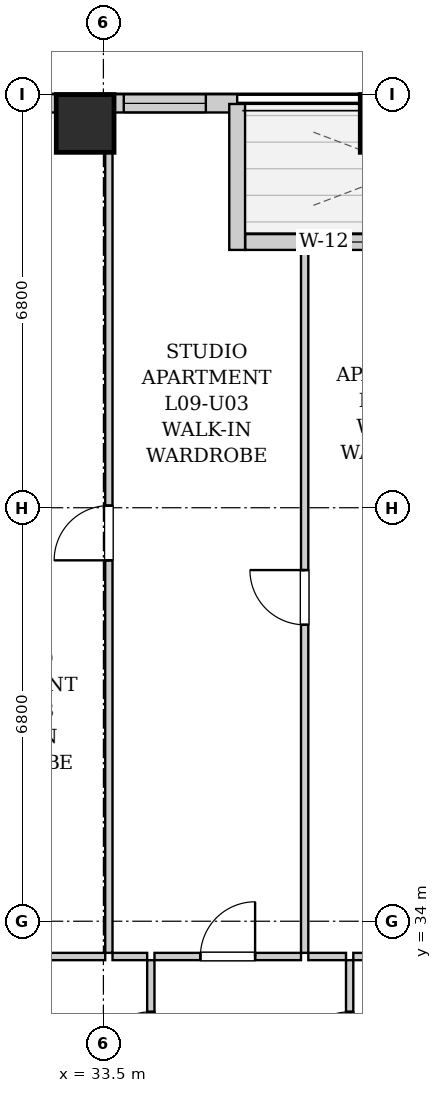
"""IFC4 building model, lengths in metres.
Left out: names, types, materials, properties, quantities, classifications, styles, units other than length and angle.
Written with IfcOpenShell. Run it as: python <this file> out.ifc"""

import sys

from ifc_helpers import new_model, si_unit, direction, frame, frame_2d, origin, origin_2d, place, context, subcontext, project, spatial, rectangle, extrude, element, fill, save


model = new_model("IFC4")
c1 = context("Model", 3, precision=1e-05, world=origin(), true_north=direction((0.0, 1.0)))
c2 = subcontext(c1, "Body", "Model", "MODEL_VIEW")
j1 = project(units=[si_unit("LENGTHUNIT", "METRE"), si_unit("PLANEANGLEUNIT", "RADIAN")], contexts=[c1])
p1 = place(None, origin())
s1 = spatial("IfcSite", under=j1, at=p1, CompositionType="ELEMENT")
p2 = place(p1, origin())
s2 = spatial("IfcBuilding", under=s1, at=p2, CompositionType="ELEMENT")
p3 = place(p2, frame((0.0, 0.0, 38.6)))
s3 = spatial("IfcBuildingStorey", under=s2, at=p3, CompositionType="ELEMENT", Elevation=38.6)
for number, where, z_axis, x_axis in (
    (1, (33.2, 47.12, 0.0), (0.0, 0.0, 1.0), (1.0, 0.0, 0.0)),
    (2, (38.2, 47.12, 0.0), (0.0, 0.0, 1.0), (1.0, 0.0, 0.0)),
):
    element("IfcColumn", number, at=place(p3, frame(where, z_axis=z_axis, x_axis=x_axis)), inside=s3, PredefinedType="COLUMN", context=c2, shape_type="SweptSolid", body=[
        extrude(rectangle(XDim=0.95, YDim=0.95, at=origin_2d()), origin(), (0.0, 0.0, 1.0), 3.2),
    ])
p4 = place(p3, frame((10.0, 47.45, 0.0), z_axis=(0.0, 0.0, 1.0), x_axis=(1.0, 0.0, 0.0)))
e3 = element("IfcWall", 3, at=p4, inside=s3, PredefinedType="SOLIDWALL", context=c2, shape_type="SweptSolid", body=[
    extrude(rectangle(XDim=25.7, YDim=0.3, at=frame_2d((12.85, 0.0))), origin(), (0.0, 0.0, 1.0), 1.975),
])
p5 = place(p4, frame((1.73, 0.0, 0.55)))
e4 = element("IfcOpeningElement", 4, at=p5, cuts=e3, PredefinedType="OPENING", context=c2, shape_type="SweptSolid", body=[
    extrude(rectangle(XDim=1.8, YDim=1.2, at=frame_2d((0.9, 0.6))), frame((0.0, 0.16, 0.0), z_axis=(0.0, -1.0, 0.0), x_axis=(1.0, 0.0, 0.0)), (0.0, 0.0, 1.0), 0.32),
])
p6 = place(p4, frame((4.961, 0.0, 0.55)))
e5 = element("IfcOpeningElement", 5, at=p6, cuts=e3, PredefinedType="OPENING", context=c2, shape_type="SweptSolid", body=[
    extrude(rectangle(XDim=1.8, YDim=1.2, at=frame_2d((0.9, 0.6))), frame((0.0, 0.16, 0.0), z_axis=(0.0, -1.0, 0.0), x_axis=(1.0, 0.0, 0.0)), (0.0, 0.0, 1.0), 0.32),
])
p7 = place(p4, frame((8.435, 0.0, 0.55)))
e6 = element("IfcOpeningElement", 6, at=p7, cuts=e3, PredefinedType="OPENING", context=c2, shape_type="SweptSolid", body=[
    extrude(rectangle(XDim=1.8, YDim=1.2, at=frame_2d((0.9, 0.6))), frame((0.0, 0.16, 0.0), z_axis=(0.0, -1.0, 0.0), x_axis=(1.0, 0.0, 0.0)), (0.0, 0.0, 1.0), 0.32),
])
p8 = place(p4, frame((11.15, 0.0, 0.55)))
e7 = element("IfcOpeningElement", 7, at=p8, cuts=e3, PredefinedType="OPENING", context=c2, shape_type="SweptSolid", body=[
    extrude(rectangle(XDim=1.35, YDim=1.2, at=frame_2d((0.675, 0.6))), frame((0.0, 0.16, 0.0), z_axis=(0.0, -1.0, 0.0), x_axis=(1.0, 0.0, 0.0)), (0.0, 0.0, 1.0), 0.32),
])
p9 = place(p4, frame((17.812, 0.0, 0.55)))
e8 = element("IfcOpeningElement", 8, at=p9, cuts=e3, PredefinedType="OPENING", context=c2, shape_type="SweptSolid", body=[
    extrude(rectangle(XDim=1.8, YDim=1.2, at=frame_2d((0.9, 0.6))), frame((0.0, 0.16, 0.0), z_axis=(0.0, -1.0, 0.0), x_axis=(1.0, 0.0, 0.0)), (0.0, 0.0, 1.0), 0.32),
])
p10 = place(p4, frame((20.765, 0.0, 0.55)))
e9 = element("IfcOpeningElement", 9, at=p10, cuts=e3, PredefinedType="OPENING", context=c2, shape_type="SweptSolid", body=[
    extrude(rectangle(XDim=1.8, YDim=1.2, at=frame_2d((0.9, 0.6))), frame((0.0, 0.16, 0.0), z_axis=(0.0, -1.0, 0.0), x_axis=(1.0, 0.0, 0.0)), (0.0, 0.0, 1.0), 0.32),
])
p11 = place(p4, frame((23.835, 0.0, 0.55)))
e10 = element("IfcOpeningElement", 10, at=p11, cuts=e3, PredefinedType="OPENING", context=c2, shape_type="SweptSolid", body=[
    extrude(rectangle(XDim=1.35, YDim=1.2, at=frame_2d((0.675, 0.6))), frame((0.0, 0.16, 0.0), z_axis=(0.0, -1.0, 0.0), x_axis=(1.0, 0.0, 0.0)), (0.0, 0.0, 1.0), 0.32),
])
p12 = place(p3, frame((35.7, 47.44, 0.0), z_axis=(0.0, 0.0, 1.0), x_axis=(0.0, -1.0, 0.0)))
e11 = element("IfcWall", 11, at=p12, inside=s3, PredefinedType="SOLIDWALL", context=c2, shape_type="SweptSolid", body=[
    extrude(rectangle(XDim=2.4, YDim=0.26, at=frame_2d((1.2, 0.0))), origin(), (0.0, 0.0, 1.0), 2.94),
])
p13 = place(p3, frame((35.834, 45.17, 0.0), z_axis=(0.0, 0.0, 1.0), x_axis=(1.0, 0.0, 0.0)))
e12 = element("IfcWall", 12, at=p13, inside=s3, PredefinedType="SOLIDWALL", context=c2, shape_type="SweptSolid", body=[
    extrude(rectangle(XDim=5.432, YDim=0.26, at=frame_2d((2.716, 0.0))), origin(), (0.0, 0.0, 1.0), 2.94),
])
p14 = place(p13, frame((2.166, 0.0, 0.0)))
e13 = element("IfcOpeningElement", 13, at=p14, cuts=e12, PredefinedType="OPENING", context=c2, shape_type="SweptSolid", body=[
    extrude(rectangle(XDim=1.1, YDim=2.0, at=frame_2d((0.55, 1.0))), frame((0.0, 0.14, 0.0), z_axis=(0.0, -1.0, 0.0), x_axis=(1.0, 0.0, 0.0)), (0.0, 0.0, 1.0), 0.28),
])
p15 = place(p13, frame((1.326, 0.0, 0.55)))
e14 = element("IfcOpeningElement", 14, at=p15, cuts=e12, PredefinedType="OPENING", context=c2, shape_type="SweptSolid", body=[
    extrude(rectangle(XDim=0.68, YDim=1.2, at=frame_2d((0.34, 0.6))), frame((0.0, 0.14, 0.0), z_axis=(0.0, -1.0, 0.0), x_axis=(1.0, 0.0, 0.0)), (0.0, 0.0, 1.0), 0.28),
])
p16 = place(p3, frame((34.28, 30.76, 0.0), z_axis=(0.0, 0.0, 1.0), x_axis=(0.0, 1.0, 0.0)))
e15 = element("IfcWall", 15, at=p16, inside=s3, PredefinedType="PARTITIONING", context=c2, shape_type="SweptSolid", body=[
    extrude(rectangle(XDim=2.6, YDim=0.12, at=frame_2d((1.3, 0.0))), origin(), (0.0, 0.0, 1.0), 2.94),
])
p17 = place(p16, frame((0.85, 0.0, 0.0)))
e16 = element("IfcOpeningElement", 16, at=p17, cuts=e15, PredefinedType="OPENING", context=c2, shape_type="SweptSolid", body=[
    extrude(rectangle(XDim=0.9, YDim=2.05, at=frame_2d((0.45, 1.025))), frame((0.0, 0.07, 0.0), z_axis=(0.0, -1.0, 0.0), x_axis=(1.0, 0.0, 0.0)), (0.0, 0.0, 1.0), 0.14),
])
p18 = place(p3, frame((30.62, 33.42, 0.0), z_axis=(0.0, 0.0, 1.0), x_axis=(1.0, 0.0, 0.0)))
e17 = element("IfcWall", 17, at=p18, inside=s3, PredefinedType="PARTITIONING", context=c2, shape_type="SweptSolid", body=[
    extrude(rectangle(XDim=2.91, YDim=0.12, at=frame_2d((1.455, 0.0))), origin(), (0.0, 0.0, 1.0), 2.94),
])
p19 = place(p18, frame((1.005, 0.0, 0.0)))
e18 = element("IfcOpeningElement", 18, at=p19, cuts=e17, PredefinedType="OPENING", context=c2, shape_type="SweptSolid", body=[
    extrude(rectangle(XDim=0.9, YDim=2.05, at=frame_2d((0.45, 1.025))), frame((0.0, 0.07, 0.0), z_axis=(0.0, -1.0, 0.0), x_axis=(1.0, 0.0, 0.0)), (0.0, 0.0, 1.0), 0.14),
])
p20 = place(p3, frame((33.65, 33.42, 0.0), z_axis=(0.0, 0.0, 1.0), x_axis=(1.0, 0.0, 0.0)))
e19 = element("IfcWall", 19, at=p20, inside=s3, PredefinedType="PARTITIONING", context=c2, shape_type="SweptSolid", body=[
    extrude(rectangle(XDim=0.57, YDim=0.12, at=frame_2d((0.285, 0.0))), origin(), (0.0, 0.0, 1.0), 2.94),
])
p21 = place(p3, frame((37.55, 30.76, 0.0), z_axis=(0.0, 0.0, 1.0), x_axis=(0.0, 1.0, 0.0)))
e20 = element("IfcWall", 20, at=p21, inside=s3, PredefinedType="PARTITIONING", context=c2, shape_type="SweptSolid", body=[
    extrude(rectangle(XDim=2.6, YDim=0.12, at=frame_2d((1.3, 0.0))), origin(), (0.0, 0.0, 1.0), 2.94),
])
p22 = place(p21, frame((0.85, 0.0, 0.0)))
e21 = element("IfcOpeningElement", 21, at=p22, cuts=e20, PredefinedType="OPENING", context=c2, shape_type="SweptSolid", body=[
    extrude(rectangle(XDim=0.9, YDim=2.05, at=frame_2d((0.45, 1.025))), frame((0.0, 0.07, 0.0), z_axis=(0.0, -1.0, 0.0), x_axis=(1.0, 0.0, 0.0)), (0.0, 0.0, 1.0), 0.14),
])
p23 = place(p3, frame((34.34, 33.42, 0.0), z_axis=(0.0, 0.0, 1.0), x_axis=(1.0, 0.0, 0.0)))
e22 = element("IfcWall", 22, at=p23, inside=s3, PredefinedType="PARTITIONING", context=c2, shape_type="SweptSolid", body=[
    extrude(rectangle(XDim=2.41, YDim=0.12, at=frame_2d((1.205, 0.0))), origin(), (0.0, 0.0, 1.0), 2.94),
])
p24 = place(p23, frame((0.755, 0.0, 0.0)))
e23 = element("IfcOpeningElement", 23, at=p24, cuts=e22, PredefinedType="OPENING", context=c2, shape_type="SweptSolid", body=[
    extrude(rectangle(XDim=0.9, YDim=2.05, at=frame_2d((0.45, 1.025))), frame((0.0, 0.07, 0.0), z_axis=(0.0, -1.0, 0.0), x_axis=(1.0, 0.0, 0.0)), (0.0, 0.0, 1.0), 0.14),
])
p25 = place(p3, frame((36.87, 33.42, 0.0), z_axis=(0.0, 0.0, 1.0), x_axis=(1.0, 0.0, 0.0)))
e24 = element("IfcWall", 24, at=p25, inside=s3, PredefinedType="PARTITIONING", context=c2, shape_type="SweptSolid", body=[
    extrude(rectangle(XDim=0.62, YDim=0.12, at=frame_2d((0.31, 0.0))), origin(), (0.0, 0.0, 1.0), 2.94),
])
p26 = place(p3, frame((37.61, 33.42, 0.0), z_axis=(0.0, 0.0, 1.0), x_axis=(1.0, 0.0, 0.0)))
e25 = element("IfcWall", 25, at=p26, inside=s3, PredefinedType="PARTITIONING", context=c2, shape_type="SweptSolid", body=[
    extrude(rectangle(XDim=2.36, YDim=0.12, at=frame_2d((1.18, 0.0))), origin(), (0.0, 0.0, 1.0), 2.94),
])
p27 = place(p26, frame((0.73, 0.0, 0.0)))
e26 = element("IfcOpeningElement", 26, at=p27, cuts=e25, PredefinedType="OPENING", context=c2, shape_type="SweptSolid", body=[
    extrude(rectangle(XDim=0.9, YDim=2.05, at=frame_2d((0.45, 1.025))), frame((0.0, 0.07, 0.0), z_axis=(0.0, -1.0, 0.0), x_axis=(1.0, 0.0, 0.0)), (0.0, 0.0, 1.0), 0.14),
])
p28 = place(p3, frame((33.59, 33.48, 0.0), z_axis=(0.0, 0.0, 1.0), x_axis=(0.0, 1.0, 0.0)))
e27 = element("IfcWall", 27, at=p28, inside=s3, PredefinedType="PARTITIONING", context=c2, shape_type="SweptSolid", body=[
    extrude(rectangle(XDim=13.84, YDim=0.12, at=frame_2d((6.92, 0.0))), origin(), (0.0, 0.0, 1.0), 2.94),
])
p29 = place(p28, frame((6.455, 0.0, 0.0)))
e28 = element("IfcOpeningElement", 28, at=p29, cuts=e27, PredefinedType="OPENING", context=c2, shape_type="SweptSolid", body=[
    extrude(rectangle(XDim=0.9, YDim=2.05, at=frame_2d((0.45, 1.025))), frame((0.0, 0.07, 0.0), z_axis=(0.0, -1.0, 0.0), x_axis=(1.0, 0.0, 0.0)), (0.0, 0.0, 1.0), 0.14),
])
p30 = place(p3, frame((36.81, 33.48, 0.0), z_axis=(0.0, 0.0, 1.0), x_axis=(0.0, 1.0, 0.0)))
e29 = element("IfcWall", 29, at=p30, inside=s3, PredefinedType="PARTITIONING", context=c2, shape_type="SweptSolid", body=[
    extrude(rectangle(XDim=11.69, YDim=0.12, at=frame_2d((5.845, 0.0))), origin(), (0.0, 0.0, 1.0), 2.94),
])
p31 = place(p30, frame((5.395, 0.0, 0.0)))
e30 = element("IfcOpeningElement", 30, at=p31, cuts=e29, PredefinedType="OPENING", context=c2, shape_type="SweptSolid", body=[
    extrude(rectangle(XDim=0.9, YDim=2.05, at=frame_2d((0.45, 1.025))), frame((0.0, 0.07, 0.0), z_axis=(0.0, -1.0, 0.0), x_axis=(1.0, 0.0, 0.0)), (0.0, 0.0, 1.0), 0.14),
])
p32 = place(p17, origin())
e31 = element("IfcDoor", 31, at=p32, inside=s3, OperationType="SINGLE_SWING_LEFT", PredefinedType="DOOR", context=c2, shape_type="SweptSolid", body=[
    extrude(rectangle(XDim=0.9, YDim=2.05, at=frame_2d((0.45, 1.025))), frame((0.0, 0.025, 0.0), z_axis=(0.0, -1.0, 0.0), x_axis=(1.0, 0.0, 0.0)), (0.0, 0.0, 1.0), 0.05),
])
fill(e16, e31)
p33 = place(p22, origin())
e32 = element("IfcDoor", 32, at=p33, inside=s3, OperationType="SINGLE_SWING_LEFT", PredefinedType="DOOR", context=c2, shape_type="SweptSolid", body=[
    extrude(rectangle(XDim=0.9, YDim=2.05, at=frame_2d((0.45, 1.025))), frame((0.0, 0.025, 0.0), z_axis=(0.0, -1.0, 0.0), x_axis=(1.0, 0.0, 0.0)), (0.0, 0.0, 1.0), 0.05),
])
fill(e21, e32)
p34 = place(p24, origin())
e33 = element("IfcDoor", 33, at=p34, inside=s3, OperationType="SINGLE_SWING_RIGHT", PredefinedType="DOOR", context=c2, shape_type="SweptSolid", body=[
    extrude(rectangle(XDim=0.9, YDim=2.05, at=frame_2d((0.45, 1.025))), frame((0.0, 0.025, 0.0), z_axis=(0.0, -1.0, 0.0), x_axis=(1.0, 0.0, 0.0)), (0.0, 0.0, 1.0), 0.05),
])
fill(e23, e33)
p35 = place(p29, origin())
e34 = element("IfcDoor", 34, at=p35, inside=s3, OperationType="SINGLE_SWING_LEFT", PredefinedType="DOOR", context=c2, shape_type="SweptSolid", body=[
    extrude(rectangle(XDim=0.9, YDim=2.05, at=frame_2d((0.45, 1.025))), frame((0.0, 0.025, 0.0), z_axis=(0.0, -1.0, 0.0), x_axis=(1.0, 0.0, 0.0)), (0.0, 0.0, 1.0), 0.05),
])
fill(e28, e34)
p36 = place(p31, origin())
e35 = element("IfcDoor", 35, at=p36, inside=s3, OperationType="SINGLE_SWING_RIGHT", PredefinedType="DOOR", context=c2, shape_type="SweptSolid", body=[
    extrude(rectangle(XDim=0.9, YDim=2.05, at=frame_2d((0.45, 1.025))), frame((0.0, 0.025, 0.0), z_axis=(0.0, -1.0, 0.0), x_axis=(1.0, 0.0, 0.0)), (0.0, 0.0, 1.0), 0.05),
])
fill(e30, e35)
p37 = place(p11, origin())
e36 = element("IfcWindow", 36, at=p37, inside=s3, PartitioningType="SINGLE_PANEL", PredefinedType="WINDOW", context=c2, shape_type="SweptSolid", body=[
    extrude(rectangle(XDim=1.35, YDim=1.2, at=frame_2d((0.675, 0.6))), frame((0.0, 0.03, 0.0), z_axis=(0.0, -1.0, 0.0), x_axis=(1.0, 0.0, 0.0)), (0.0, 0.0, 1.0), 0.06),
])
fill(e10, e36)
p38 = place(p15, origin())
e37 = element("IfcWindow", 37, at=p38, inside=s3, PartitioningType="SINGLE_PANEL", PredefinedType="WINDOW", context=c2, shape_type="SweptSolid", body=[
    extrude(rectangle(XDim=0.68, YDim=1.2, at=frame_2d((0.34, 0.6))), frame((0.0, 0.03, 0.0), z_axis=(0.0, -1.0, 0.0), x_axis=(1.0, 0.0, 0.0)), (0.0, 0.0, 1.0), 0.06),
])
fill(e14, e37)
save(model, sys.argv[1])
